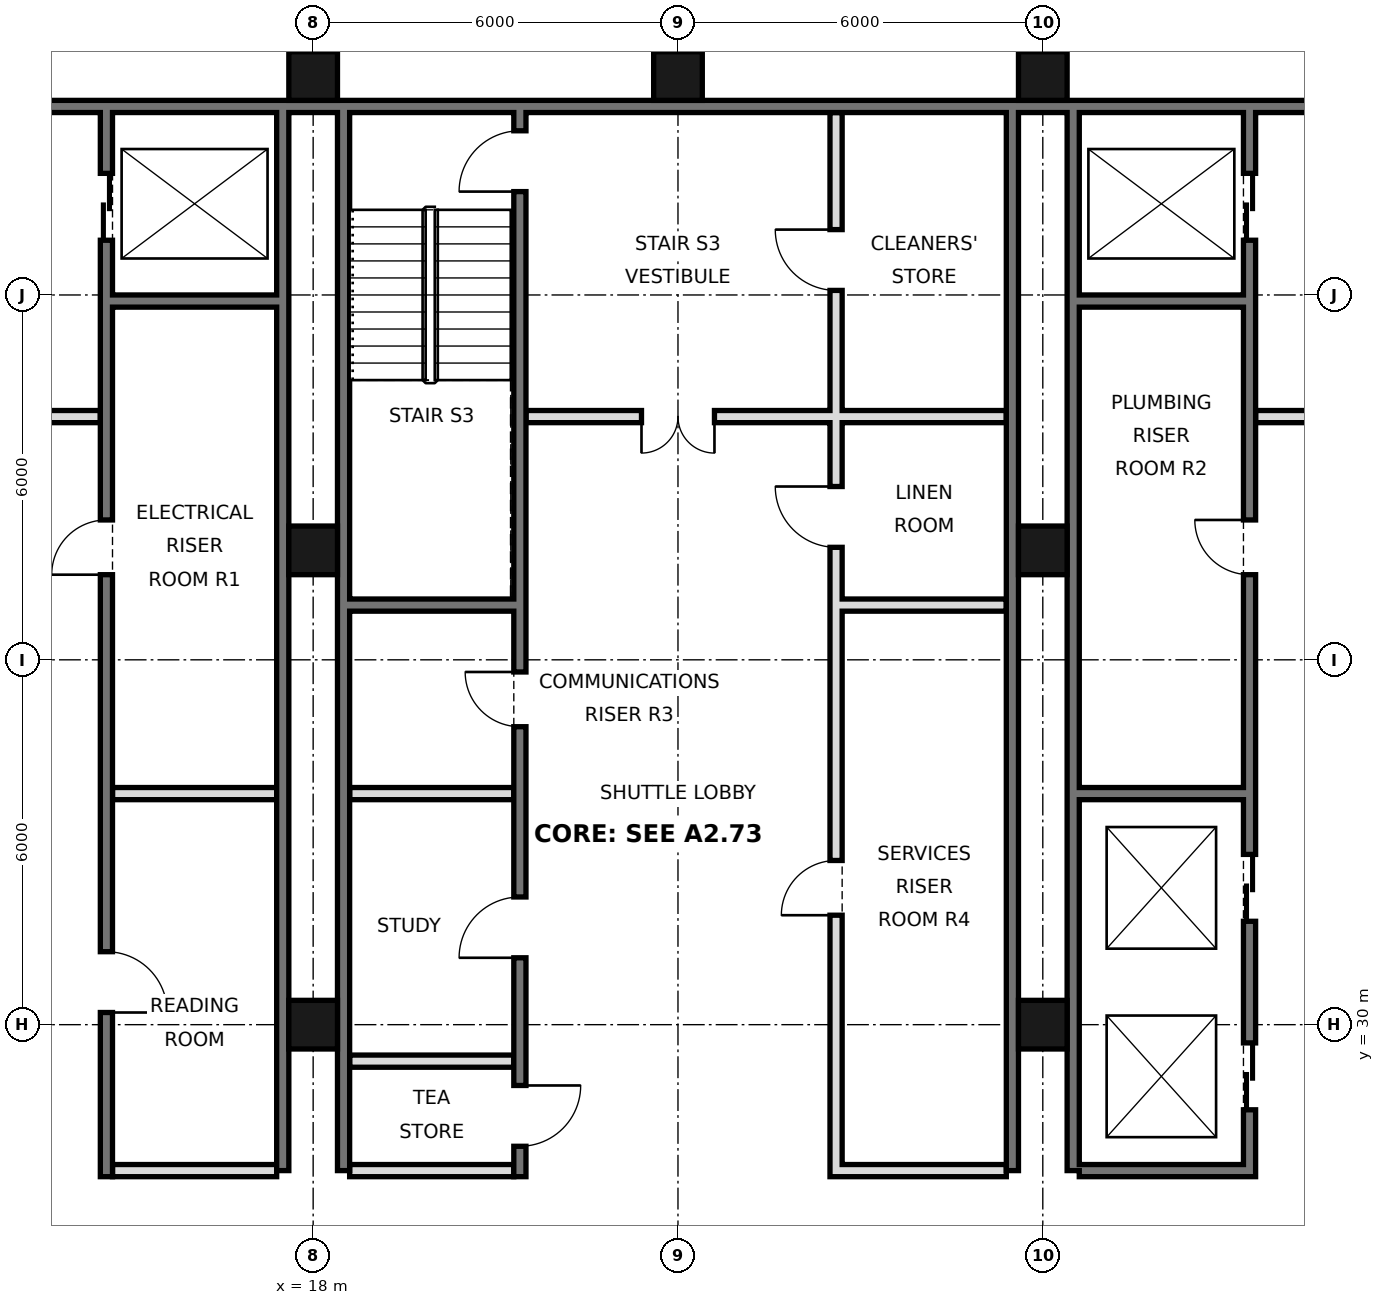
"""IFC4 building model, lengths in metres.
Left out: names, types, materials, properties, quantities, classifications, styles, units other than length and angle.
Written with IfcOpenShell. Run it as: python <this file> out.ifc"""

import sys

from ifc_helpers import new_model, si_unit, direction, frame, frame_2d, origin, origin_2d, place, context, subcontext, project, spatial, rectangle, hollow_rectangle, extrude, element, fill, save


model = new_model("IFC4")
c1 = context("Model", 3, precision=1e-05, world=origin(), true_north=direction((0.0, 1.0)))
c2 = subcontext(c1, "Body", "Model", "MODEL_VIEW")
j1 = project(units=[si_unit("LENGTHUNIT", "METRE"), si_unit("PLANEANGLEUNIT", "RADIAN")], contexts=[c1])
p1 = place(None, origin())
s1 = spatial("IfcSite", under=j1, at=p1, CompositionType="ELEMENT")
p2 = place(p1, origin())
s2 = spatial("IfcBuilding", under=s1, at=p2, CompositionType="ELEMENT")
p3 = place(p2, frame((0.0, 0.0, 294.4)))
s3 = spatial("IfcBuildingStorey", under=s2, at=p3, CompositionType="ELEMENT", Elevation=294.4)
for number, where, z_axis, x_axis in (
    (1, (18.0, 30.0, 0.0), (0.0, 0.0, 1.0), (1.0, 0.0, 0.0)),
    (2, (18.0, 37.8, 0.0), (0.0, 0.0, 1.0), (1.0, 0.0, 0.0)),
    (3, (18.0, 45.6, 0.0), (0.0, 0.0, 1.0), (1.0, 0.0, 0.0)),
    (4, (24.0, 45.6, 0.0), (0.0, 0.0, 1.0), (1.0, 0.0, 0.0)),
    (5, (30.0, 30.0, 0.0), (0.0, 0.0, 1.0), (1.0, 0.0, 0.0)),
    (6, (30.0, 37.8, 0.0), (0.0, 0.0, 1.0), (1.0, 0.0, 0.0)),
    (7, (30.0, 45.6, 0.0), (0.0, 0.0, 1.0), (1.0, 0.0, 0.0)),
):
    element("IfcColumn", number, at=place(p3, frame(where, z_axis=z_axis, x_axis=x_axis)), inside=s3, PredefinedType="COLUMN", context=c2, shape_type="SweptSolid", body=[
        extrude(hollow_rectangle(XDim=0.8, YDim=0.8, WallThickness=0.032, at=origin_2d()), origin(), (0.0, 0.0, 1.0), 3.6),
    ])
p4 = place(p3, frame((6.6, 45.1, 0.0), z_axis=(0.0, 0.0, 1.0), x_axis=(1.0, 0.0, 0.0)))
e8 = element("IfcWall", 8, at=p4, inside=s3, PredefinedType="SOLIDWALL", context=c2, shape_type="SweptSolid", body=[
    extrude(rectangle(XDim=34.8, YDim=0.2, at=frame_2d((17.4, 0.0))), origin(), (0.0, 0.0, 1.0), 3.42),
])
for number, where, z_axis, x_axis in (
    (9, (17.5, 27.6, 0.0), (0.0, 0.0, 1.0), (0.0, 1.0, 0.0)),
    (10, (18.5, 27.6, 0.0), (0.0, 0.0, 1.0), (0.0, 1.0, 0.0)),
    (11, (29.5, 27.6, 0.0), (0.0, 0.0, 1.0), (0.0, 1.0, 0.0)),
    (12, (30.5, 27.6, 0.0), (0.0, 0.0, 1.0), (0.0, 1.0, 0.0)),
):
    element("IfcWall", number, at=place(p3, frame(where, z_axis=z_axis, x_axis=x_axis)), inside=s3, PredefinedType="SOLIDWALL", context=c2, shape_type="SweptSolid", body=[
        extrude(rectangle(XDim=17.5, YDim=0.2, at=frame_2d((8.75, 0.0))), origin(), (0.0, 0.0, 1.0), 3.42),
    ])
p5 = place(p3, frame((14.6, 27.5, 0.0), z_axis=(0.0, 0.0, 1.0), x_axis=(0.0, 1.0, 0.0)))
e13 = element("IfcWall", 13, at=p5, inside=s3, PredefinedType="SOLIDWALL", context=c2, shape_type="SweptSolid", body=[
    extrude(rectangle(XDim=17.5, YDim=0.2, at=frame_2d((8.75, 0.0))), origin(), (0.0, 0.0, 1.0), 3.42),
])
p6 = place(p5, frame((15.4, 0.0, 0.0)))
e14 = element("IfcOpeningElement", 14, at=p6, cuts=e13, PredefinedType="OPENING", context=c2, shape_type="SweptSolid", body=[
    extrude(rectangle(XDim=1.1, YDim=2.1, at=frame_2d((0.55, 1.05))), frame((0.0, 0.11, 0.0), z_axis=(0.0, -1.0, 0.0), x_axis=(1.0, 0.0, 0.0)), (0.0, 0.0, 1.0), 0.22),
])
p7 = place(p5, frame((2.7, 0.0, 0.0)))
e15 = element("IfcOpeningElement", 15, at=p7, cuts=e13, PredefinedType="OPENING", context=c2, shape_type="SweptSolid", body=[
    extrude(rectangle(XDim=1.0, YDim=2.1, at=frame_2d((0.5, 1.05))), frame((0.0, 0.11, 0.0), z_axis=(0.0, -1.0, 0.0), x_axis=(1.0, 0.0, 0.0)), (0.0, 0.0, 1.0), 0.22),
])
p8 = place(p5, frame((9.9, 0.0, 0.0)))
e16 = element("IfcOpeningElement", 16, at=p8, cuts=e13, PredefinedType="OPENING", context=c2, shape_type="SweptSolid", body=[
    extrude(rectangle(XDim=0.9, YDim=2.1, at=frame_2d((0.45, 1.05))), frame((0.0, 0.11, 0.0), z_axis=(0.0, -1.0, 0.0), x_axis=(1.0, 0.0, 0.0)), (0.0, 0.0, 1.0), 0.22),
])
p9 = place(p3, frame((21.4, 27.5, 0.0), z_axis=(0.0, 0.0, 1.0), x_axis=(0.0, 1.0, 0.0)))
e17 = element("IfcWall", 17, at=p9, inside=s3, PredefinedType="SOLIDWALL", context=c2, shape_type="SweptSolid", body=[
    extrude(rectangle(XDim=17.5, YDim=0.2, at=frame_2d((8.75, 0.0))), origin(), (0.0, 0.0, 1.0), 3.42),
])
p10 = place(p9, frame((0.5, 0.0, 0.0)))
e18 = element("IfcOpeningElement", 18, at=p10, cuts=e17, PredefinedType="OPENING", context=c2, shape_type="SweptSolid", body=[
    extrude(rectangle(XDim=1.0, YDim=2.1, at=frame_2d((0.5, 1.05))), frame((0.0, 0.11, 0.0), z_axis=(0.0, -1.0, 0.0), x_axis=(1.0, 0.0, 0.0)), (0.0, 0.0, 1.0), 0.22),
])
p11 = place(p9, frame((3.6, 0.0, 0.0)))
e19 = element("IfcOpeningElement", 19, at=p11, cuts=e17, PredefinedType="OPENING", context=c2, shape_type="SweptSolid", body=[
    extrude(rectangle(XDim=1.0, YDim=2.1, at=frame_2d((0.5, 1.05))), frame((0.0, 0.11, 0.0), z_axis=(0.0, -1.0, 0.0), x_axis=(1.0, 0.0, 0.0)), (0.0, 0.0, 1.0), 0.22),
])
p12 = place(p9, frame((16.2, 0.0, 0.0)))
e20 = element("IfcOpeningElement", 20, at=p12, cuts=e17, PredefinedType="OPENING", context=c2, shape_type="SweptSolid", body=[
    extrude(rectangle(XDim=1.0, YDim=2.1, at=frame_2d((0.5, 1.05))), frame((0.0, 0.11, 0.0), z_axis=(0.0, -1.0, 0.0), x_axis=(1.0, 0.0, 0.0)), (0.0, 0.0, 1.0), 0.22),
])
p13 = place(p9, frame((7.4, 0.0, 0.0)))
e21 = element("IfcOpeningElement", 21, at=p13, cuts=e17, PredefinedType="OPENING", context=c2, shape_type="SweptSolid", body=[
    extrude(rectangle(XDim=0.9, YDim=2.1, at=frame_2d((0.45, 1.05))), frame((0.0, 0.11, 0.0), z_axis=(0.0, -1.0, 0.0), x_axis=(1.0, 0.0, 0.0)), (0.0, 0.0, 1.0), 0.22),
])
p14 = place(p3, frame((26.6, 27.5, 0.0), z_axis=(0.0, 0.0, 1.0), x_axis=(0.0, 1.0, 0.0)))
e22 = element("IfcWall", 22, at=p14, inside=s3, PredefinedType="SOLIDWALL", context=c2, shape_type="SweptSolid", body=[
    extrude(rectangle(XDim=17.5, YDim=0.2, at=frame_2d((8.75, 0.0))), origin(), (0.0, 0.0, 1.0), 3.42),
])
p15 = place(p14, frame((4.3, 0.0, 0.0)))
e23 = element("IfcOpeningElement", 23, at=p15, cuts=e22, PredefinedType="OPENING", context=c2, shape_type="SweptSolid", body=[
    extrude(rectangle(XDim=0.9, YDim=2.1, at=frame_2d((0.45, 1.05))), frame((0.0, 0.11, 0.0), z_axis=(0.0, -1.0, 0.0), x_axis=(1.0, 0.0, 0.0)), (0.0, 0.0, 1.0), 0.22),
])
p16 = place(p14, frame((10.35, 0.0, 0.0)))
e24 = element("IfcOpeningElement", 24, at=p16, cuts=e22, PredefinedType="OPENING", context=c2, shape_type="SweptSolid", body=[
    extrude(rectangle(XDim=1.0, YDim=2.1, at=frame_2d((0.5, 1.05))), frame((0.0, 0.11, 0.0), z_axis=(0.0, -1.0, 0.0), x_axis=(1.0, 0.0, 0.0)), (0.0, 0.0, 1.0), 0.22),
])
p17 = place(p14, frame((14.575, 0.0, 0.0)))
e25 = element("IfcOpeningElement", 25, at=p17, cuts=e22, PredefinedType="OPENING", context=c2, shape_type="SweptSolid", body=[
    extrude(rectangle(XDim=1.0, YDim=2.1, at=frame_2d((0.5, 1.05))), frame((0.0, 0.11, 0.0), z_axis=(0.0, -1.0, 0.0), x_axis=(1.0, 0.0, 0.0)), (0.0, 0.0, 1.0), 0.22),
])
p18 = place(p3, frame((33.4, 27.5, 0.0), z_axis=(0.0, 0.0, 1.0), x_axis=(0.0, 1.0, 0.0)))
e26 = element("IfcWall", 26, at=p18, inside=s3, PredefinedType="SOLIDWALL", context=c2, shape_type="SweptSolid", body=[
    extrude(rectangle(XDim=17.5, YDim=0.2, at=frame_2d((8.75, 0.0))), origin(), (0.0, 0.0, 1.0), 3.42),
])
p19 = place(p18, frame((1.1, 0.0, 0.0)))
e27 = element("IfcOpeningElement", 27, at=p19, cuts=e26, PredefinedType="OPENING", context=c2, shape_type="SweptSolid", body=[
    extrude(rectangle(XDim=1.1, YDim=2.1, at=frame_2d((0.55, 1.05))), frame((0.0, 0.11, 0.0), z_axis=(0.0, -1.0, 0.0), x_axis=(1.0, 0.0, 0.0)), (0.0, 0.0, 1.0), 0.22),
])
p20 = place(p18, frame((4.2, 0.0, 0.0)))
e28 = element("IfcOpeningElement", 28, at=p20, cuts=e26, PredefinedType="OPENING", context=c2, shape_type="SweptSolid", body=[
    extrude(rectangle(XDim=1.1, YDim=2.1, at=frame_2d((0.55, 1.05))), frame((0.0, 0.11, 0.0), z_axis=(0.0, -1.0, 0.0), x_axis=(1.0, 0.0, 0.0)), (0.0, 0.0, 1.0), 0.22),
])
p21 = place(p18, frame((15.4, 0.0, 0.0)))
e29 = element("IfcOpeningElement", 29, at=p21, cuts=e26, PredefinedType="OPENING", context=c2, shape_type="SweptSolid", body=[
    extrude(rectangle(XDim=1.1, YDim=2.1, at=frame_2d((0.55, 1.05))), frame((0.0, 0.11, 0.0), z_axis=(0.0, -1.0, 0.0), x_axis=(1.0, 0.0, 0.0)), (0.0, 0.0, 1.0), 0.22),
])
p22 = place(p18, frame((9.9, 0.0, 0.0)))
e30 = element("IfcOpeningElement", 30, at=p22, cuts=e26, PredefinedType="OPENING", context=c2, shape_type="SweptSolid", body=[
    extrude(rectangle(XDim=0.9, YDim=2.1, at=frame_2d((0.45, 1.05))), frame((0.0, 0.11, 0.0), z_axis=(0.0, -1.0, 0.0), x_axis=(1.0, 0.0, 0.0)), (0.0, 0.0, 1.0), 0.22),
])
for number, where, z_axis, x_axis in (
    (31, (14.7, 27.6, 0.0), (0.0, 0.0, 1.0), (1.0, 0.0, 0.0)),
    (32, (18.6, 27.6, 0.0), (0.0, 0.0, 1.0), (1.0, 0.0, 0.0)),
):
    element("IfcWall", number, at=place(p3, frame(where, z_axis=z_axis, x_axis=x_axis)), inside=s3, PredefinedType="PARTITIONING", context=c2, shape_type="SweptSolid", body=[
        extrude(rectangle(XDim=2.7, YDim=0.2, at=frame_2d((1.35, 0.0))), origin(), (0.0, 0.0, 1.0), 3.42),
    ])
for number, where, z_axis, x_axis in (
    (33, (26.7, 27.6, 0.0), (0.0, 0.0, 1.0), (1.0, 0.0, 0.0)),
    (34, (30.6, 27.6, 0.0), (0.0, 0.0, 1.0), (1.0, 0.0, 0.0)),
):
    element("IfcWall", number, at=place(p3, frame(where, z_axis=z_axis, x_axis=x_axis)), inside=s3, PredefinedType="SOLIDWALL", context=c2, shape_type="SweptSolid", body=[
        extrude(rectangle(XDim=2.7, YDim=0.2, at=frame_2d((1.35, 0.0))), origin(), (0.0, 0.0, 1.0), 3.42),
    ])
p23 = place(p3, frame((18.6, 29.4, 0.0), z_axis=(0.0, 0.0, 1.0), x_axis=(1.0, 0.0, 0.0)))
e35 = element("IfcWall", 35, at=p23, inside=s3, PredefinedType="PARTITIONING", context=c2, shape_type="SweptSolid", body=[
    extrude(rectangle(XDim=2.7, YDim=0.2, at=frame_2d((1.35, 0.0))), origin(), (0.0, 0.0, 1.0), 3.42),
])
for number, where, z_axis, x_axis in (
    (36, (14.7, 33.8, 0.0), (0.0, 0.0, 1.0), (1.0, 0.0, 0.0)),
    (37, (18.6, 33.8, 0.0), (0.0, 0.0, 1.0), (1.0, 0.0, 0.0)),
    (38, (30.6, 33.8, 0.0), (0.0, 0.0, 1.0), (1.0, 0.0, 0.0)),
    (39, (18.6, 36.9, 0.0), (0.0, 0.0, 1.0), (1.0, 0.0, 0.0)),
    (40, (26.7, 36.9, 0.0), (0.0, 0.0, 1.0), (1.0, 0.0, 0.0)),
):
    element("IfcWall", number, at=place(p3, frame(where, z_axis=z_axis, x_axis=x_axis)), inside=s3, PredefinedType="SOLIDWALL", context=c2, shape_type="SweptSolid", body=[
        extrude(rectangle(XDim=2.7, YDim=0.2, at=frame_2d((1.35, 0.0))), origin(), (0.0, 0.0, 1.0), 3.42),
    ])
p24 = place(p3, frame((21.5, 40.0, 0.0), z_axis=(0.0, 0.0, 1.0), x_axis=(1.0, 0.0, 0.0)))
e41 = element("IfcWall", 41, at=p24, inside=s3, PredefinedType="PARTITIONING", context=c2, shape_type="SweptSolid", body=[
    extrude(rectangle(XDim=7.9, YDim=0.2, at=frame_2d((3.95, 0.0))), origin(), (0.0, 0.0, 1.0), 3.42),
])
p25 = place(p24, frame((1.9, 0.0, 0.0)))
e42 = element("IfcOpeningElement", 42, at=p25, cuts=e41, PredefinedType="OPENING", context=c2, shape_type="SweptSolid", body=[
    extrude(rectangle(XDim=1.2, YDim=2.1, at=frame_2d((0.6, 1.05))), frame((0.0, 0.11, 0.0), z_axis=(0.0, -1.0, 0.0), x_axis=(1.0, 0.0, 0.0)), (0.0, 0.0, 1.0), 0.22),
])
p26 = place(p3, frame((33.5, 40.0, 0.0), z_axis=(0.0, 0.0, 1.0), x_axis=(1.0, 0.0, 0.0)))
e43 = element("IfcWall", 43, at=p26, inside=s3, PredefinedType="PARTITIONING", context=c2, shape_type="SweptSolid", body=[
    extrude(rectangle(XDim=5.0, YDim=0.2, at=frame_2d((2.5, 0.0))), origin(), (0.0, 0.0, 1.0), 3.42),
])
p27 = place(p26, frame((1.9, 0.0, 0.0)))
e44 = element("IfcOpeningElement", 44, at=p27, cuts=e43, PredefinedType="OPENING", context=c2, shape_type="SweptSolid", body=[
    extrude(rectangle(XDim=1.2, YDim=2.1, at=frame_2d((0.6, 1.05))), frame((0.0, 0.11, 0.0), z_axis=(0.0, -1.0, 0.0), x_axis=(1.0, 0.0, 0.0)), (0.0, 0.0, 1.0), 0.22),
])
p28 = place(p3, frame((9.5, 40.0, 0.0), z_axis=(0.0, 0.0, 1.0), x_axis=(1.0, 0.0, 0.0)))
e45 = element("IfcWall", 45, at=p28, inside=s3, PredefinedType="PARTITIONING", context=c2, shape_type="SweptSolid", body=[
    extrude(rectangle(XDim=5.0, YDim=0.2, at=frame_2d((2.5, 0.0))), origin(), (0.0, 0.0, 1.0), 3.42),
])
p29 = place(p28, frame((1.9, 0.0, 0.0)))
e46 = element("IfcOpeningElement", 46, at=p29, cuts=e45, PredefinedType="OPENING", context=c2, shape_type="SweptSolid", body=[
    extrude(rectangle(XDim=1.2, YDim=2.1, at=frame_2d((0.6, 1.05))), frame((0.0, 0.11, 0.0), z_axis=(0.0, -1.0, 0.0), x_axis=(1.0, 0.0, 0.0)), (0.0, 0.0, 1.0), 0.22),
])
for number, where, z_axis, x_axis in (
    (47, (14.7, 41.9, 0.0), (0.0, 0.0, 1.0), (1.0, 0.0, 0.0)),
    (48, (30.6, 41.9, 0.0), (0.0, 0.0, 1.0), (1.0, 0.0, 0.0)),
):
    element("IfcWall", number, at=place(p3, frame(where, z_axis=z_axis, x_axis=x_axis)), inside=s3, PredefinedType="SOLIDWALL", context=c2, shape_type="SweptSolid", body=[
        extrude(rectangle(XDim=2.7, YDim=0.2, at=frame_2d((1.35, 0.0))), origin(), (0.0, 0.0, 1.0), 3.42),
    ])
p30 = place(p25, frame((1.2, 0.0, 0.0), z_axis=(0.0, 0.0, 1.0), x_axis=(-1.0, 0.0, 0.0)))
e49 = element("IfcDoor", 49, at=p30, inside=s3, OperationType="DOUBLE_DOOR_SINGLE_SWING", PredefinedType="DOOR", context=c2, shape_type="SweptSolid", body=[
    extrude(rectangle(XDim=1.2, YDim=2.1, at=frame_2d((0.6, 1.05))), frame((0.0, 0.025, 0.0), z_axis=(0.0, -1.0, 0.0), x_axis=(1.0, 0.0, 0.0)), (0.0, 0.0, 1.0), 0.05),
])
fill(e42, e49)
p31 = place(p19, origin())
e50 = element("IfcDoor", 50, at=p31, inside=s3, OperationType="DOUBLE_DOOR_SLIDING", PredefinedType="DOOR", context=c2, shape_type="SweptSolid", body=[
    extrude(rectangle(XDim=1.1, YDim=2.1, at=frame_2d((0.55, 1.05))), frame((0.0, 0.025, 0.0), z_axis=(0.0, -1.0, 0.0), x_axis=(1.0, 0.0, 0.0)), (0.0, 0.0, 1.0), 0.05),
])
fill(e27, e50)
p32 = place(p20, origin())
e51 = element("IfcDoor", 51, at=p32, inside=s3, OperationType="DOUBLE_DOOR_SLIDING", PredefinedType="DOOR", context=c2, shape_type="SweptSolid", body=[
    extrude(rectangle(XDim=1.1, YDim=2.1, at=frame_2d((0.55, 1.05))), frame((0.0, 0.025, 0.0), z_axis=(0.0, -1.0, 0.0), x_axis=(1.0, 0.0, 0.0)), (0.0, 0.0, 1.0), 0.05),
])
fill(e28, e51)
p33 = place(p21, origin())
e52 = element("IfcDoor", 52, at=p33, inside=s3, OperationType="DOUBLE_DOOR_SLIDING", PredefinedType="DOOR", context=c2, shape_type="SweptSolid", body=[
    extrude(rectangle(XDim=1.1, YDim=2.1, at=frame_2d((0.55, 1.05))), frame((0.0, 0.025, 0.0), z_axis=(0.0, -1.0, 0.0), x_axis=(1.0, 0.0, 0.0)), (0.0, 0.0, 1.0), 0.05),
])
fill(e29, e52)
p34 = place(p6, origin())
e53 = element("IfcDoor", 53, at=p34, inside=s3, OperationType="DOUBLE_DOOR_SLIDING", PredefinedType="DOOR", context=c2, shape_type="SweptSolid", body=[
    extrude(rectangle(XDim=1.1, YDim=2.1, at=frame_2d((0.55, 1.05))), frame((0.0, 0.025, 0.0), z_axis=(0.0, -1.0, 0.0), x_axis=(1.0, 0.0, 0.0)), (0.0, 0.0, 1.0), 0.05),
])
fill(e14, e53)
p35 = place(p10, origin())
e54 = element("IfcDoor", 54, at=p35, inside=s3, OperationType="SINGLE_SWING_RIGHT", PredefinedType="DOOR", context=c2, shape_type="SweptSolid", body=[
    extrude(rectangle(XDim=1.0, YDim=2.1, at=frame_2d((0.5, 1.05))), frame((0.0, 0.025, 0.0), z_axis=(0.0, -1.0, 0.0), x_axis=(1.0, 0.0, 0.0)), (0.0, 0.0, 1.0), 0.05),
])
fill(e18, e54)
p36 = place(p11, origin())
e55 = element("IfcDoor", 55, at=p36, inside=s3, OperationType="SINGLE_SWING_LEFT", PredefinedType="DOOR", context=c2, shape_type="SweptSolid", body=[
    extrude(rectangle(XDim=1.0, YDim=2.1, at=frame_2d((0.5, 1.05))), frame((0.0, 0.025, 0.0), z_axis=(0.0, -1.0, 0.0), x_axis=(1.0, 0.0, 0.0)), (0.0, 0.0, 1.0), 0.05),
])
fill(e19, e55)
p37 = place(p7, frame((1.0, 0.0, 0.0), z_axis=(0.0, 0.0, 1.0), x_axis=(-1.0, 0.0, 0.0)))
e56 = element("IfcDoor", 56, at=p37, inside=s3, OperationType="SINGLE_SWING_RIGHT", PredefinedType="DOOR", context=c2, shape_type="SweptSolid", body=[
    extrude(rectangle(XDim=1.0, YDim=2.1, at=frame_2d((0.5, 1.05))), frame((0.0, 0.025, 0.0), z_axis=(0.0, -1.0, 0.0), x_axis=(1.0, 0.0, 0.0)), (0.0, 0.0, 1.0), 0.05),
])
fill(e15, e56)
p38 = place(p12, origin())
e57 = element("IfcDoor", 57, at=p38, inside=s3, OperationType="SINGLE_SWING_LEFT", PredefinedType="DOOR", context=c2, shape_type="SweptSolid", body=[
    extrude(rectangle(XDim=1.0, YDim=2.1, at=frame_2d((0.5, 1.05))), frame((0.0, 0.025, 0.0), z_axis=(0.0, -1.0, 0.0), x_axis=(1.0, 0.0, 0.0)), (0.0, 0.0, 1.0), 0.05),
])
fill(e20, e57)
p39 = place(p8, origin())
e58 = element("IfcDoor", 58, at=p39, inside=s3, OperationType="SINGLE_SWING_LEFT", PredefinedType="DOOR", context=c2, shape_type="SweptSolid", body=[
    extrude(rectangle(XDim=0.9, YDim=2.1, at=frame_2d((0.45, 1.05))), frame((0.0, 0.025, 0.0), z_axis=(0.0, -1.0, 0.0), x_axis=(1.0, 0.0, 0.0)), (0.0, 0.0, 1.0), 0.05),
])
fill(e16, e58)
p40 = place(p22, frame((0.9, 0.0, 0.0), z_axis=(0.0, 0.0, 1.0), x_axis=(-1.0, 0.0, 0.0)))
e59 = element("IfcDoor", 59, at=p40, inside=s3, OperationType="SINGLE_SWING_LEFT", PredefinedType="DOOR", context=c2, shape_type="SweptSolid", body=[
    extrude(rectangle(XDim=0.9, YDim=2.1, at=frame_2d((0.45, 1.05))), frame((0.0, 0.025, 0.0), z_axis=(0.0, -1.0, 0.0), x_axis=(1.0, 0.0, 0.0)), (0.0, 0.0, 1.0), 0.05),
])
fill(e30, e59)
p41 = place(p13, frame((0.9, 0.0, 0.0), z_axis=(0.0, 0.0, 1.0), x_axis=(-1.0, 0.0, 0.0)))
e60 = element("IfcDoor", 60, at=p41, inside=s3, OperationType="SINGLE_SWING_LEFT", PredefinedType="DOOR", context=c2, shape_type="SweptSolid", body=[
    extrude(rectangle(XDim=0.9, YDim=2.1, at=frame_2d((0.45, 1.05))), frame((0.0, 0.025, 0.0), z_axis=(0.0, -1.0, 0.0), x_axis=(1.0, 0.0, 0.0)), (0.0, 0.0, 1.0), 0.05),
])
fill(e21, e60)
p42 = place(p15, origin())
e61 = element("IfcDoor", 61, at=p42, inside=s3, OperationType="SINGLE_SWING_LEFT", PredefinedType="DOOR", context=c2, shape_type="SweptSolid", body=[
    extrude(rectangle(XDim=0.9, YDim=2.1, at=frame_2d((0.45, 1.05))), frame((0.0, 0.025, 0.0), z_axis=(0.0, -1.0, 0.0), x_axis=(1.0, 0.0, 0.0)), (0.0, 0.0, 1.0), 0.05),
])
fill(e23, e61)
p43 = place(p16, frame((1.0, 0.0, 0.0), z_axis=(0.0, 0.0, 1.0), x_axis=(-1.0, 0.0, 0.0)))
e62 = element("IfcDoor", 62, at=p43, inside=s3, OperationType="SINGLE_SWING_LEFT", PredefinedType="DOOR", context=c2, shape_type="SweptSolid", body=[
    extrude(rectangle(XDim=1.0, YDim=2.1, at=frame_2d((0.5, 1.05))), frame((0.0, 0.025, 0.0), z_axis=(0.0, -1.0, 0.0), x_axis=(1.0, 0.0, 0.0)), (0.0, 0.0, 1.0), 0.05),
])
fill(e24, e62)
p44 = place(p17, frame((1.0, 0.0, 0.0), z_axis=(0.0, 0.0, 1.0), x_axis=(-1.0, 0.0, 0.0)))
e63 = element("IfcDoor", 63, at=p44, inside=s3, OperationType="SINGLE_SWING_LEFT", PredefinedType="DOOR", context=c2, shape_type="SweptSolid", body=[
    extrude(rectangle(XDim=1.0, YDim=2.1, at=frame_2d((0.5, 1.05))), frame((0.0, 0.025, 0.0), z_axis=(0.0, -1.0, 0.0), x_axis=(1.0, 0.0, 0.0)), (0.0, 0.0, 1.0), 0.05),
])
fill(e25, e63)
save(model, sys.argv[1])
